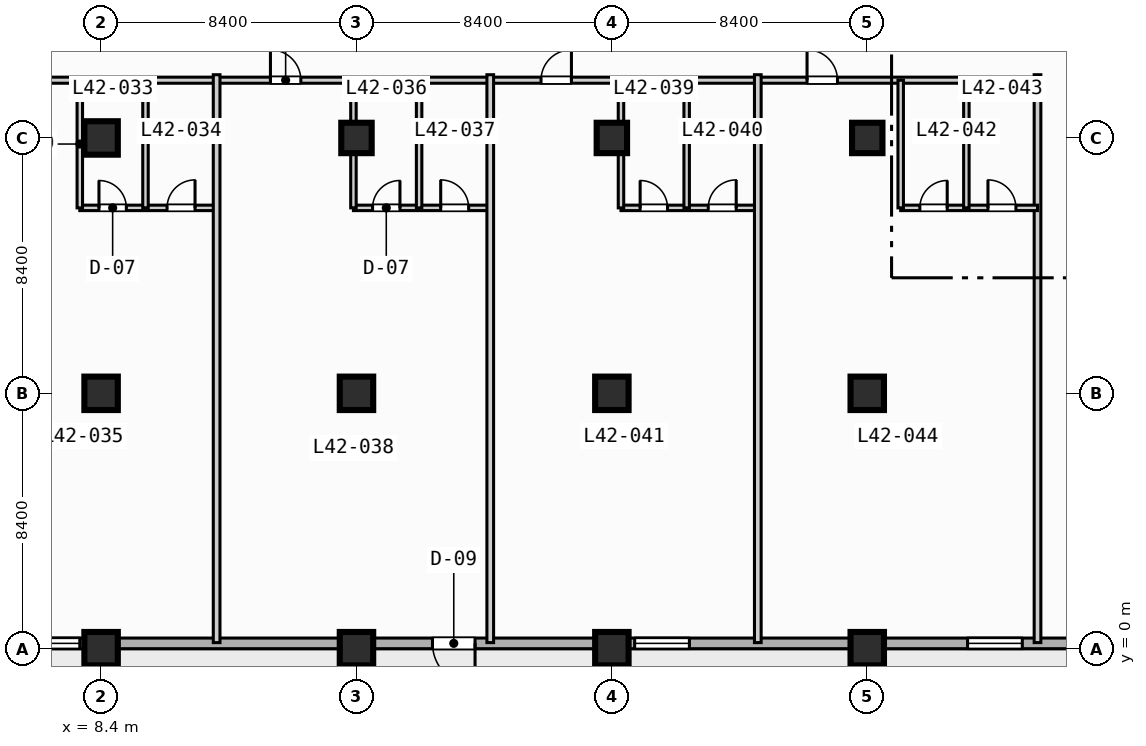
"""IFC4 building model, lengths in metres.
Left out: names, types, materials, properties, quantities, classifications, styles, units other than length and angle.
Written with IfcOpenShell. Run it as: python <this file> out.ifc"""

import sys

from ifc_helpers import new_model, si_unit, direction, frame, frame_2d, origin, origin_2d, place, context, subcontext, project, spatial, rectangle, extrude, element, fill, save


model = new_model("IFC4")
c1 = context("Model", 3, precision=1e-05, world=origin(), true_north=direction((0.0, 1.0)))
c2 = subcontext(c1, "Body", "Model", "MODEL_VIEW")
j1 = project(units=[si_unit("LENGTHUNIT", "METRE"), si_unit("PLANEANGLEUNIT", "RADIAN")], contexts=[c1])
p1 = place(None, origin())
s1 = spatial("IfcSite", under=j1, at=p1, CompositionType="ELEMENT")
p2 = place(p1, origin())
s2 = spatial("IfcBuilding", under=s1, at=p2, CompositionType="ELEMENT")
p3 = place(p2, frame((0.0, 0.0, 175.4)))
s3 = spatial("IfcBuildingStorey", under=s2, at=p3, CompositionType="ELEMENT", Elevation=175.4)
for number, where, z_axis, x_axis in (
    (1, (8.4, 0.0, 0.0), (0.0, 0.0, 1.0), (1.0, 0.0, 0.0)),
    (2, (8.4, 8.4, 0.0), (0.0, 0.0, 1.0), (1.0, 0.0, 0.0)),
    (3, (8.4, 16.8, 0.0), (0.0, 0.0, 1.0), (1.0, 0.0, 0.0)),
    (4, (16.8, 0.0, 0.0), (0.0, 0.0, 1.0), (1.0, 0.0, 0.0)),
    (5, (16.8, 8.4, 0.0), (0.0, 0.0, 1.0), (1.0, 0.0, 0.0)),
):
    element("IfcColumn", number, at=place(p3, frame(where, z_axis=z_axis, x_axis=x_axis)), inside=s3, PredefinedType="COLUMN", context=c2, shape_type="SweptSolid", body=[
        extrude(rectangle(XDim=1.1, YDim=1.1, at=origin_2d()), origin(), (0.0, 0.0, 1.0), 3.7),
    ])
p4 = place(p3, frame((16.8, 16.8, 0.0), z_axis=(0.0, 0.0, 1.0), x_axis=(1.0, 0.0, 0.0)))
e6 = element("IfcColumn", 6, at=p4, inside=s3, PredefinedType="COLUMN", context=c2, shape_type="SweptSolid", body=[
    extrude(rectangle(XDim=1.0, YDim=1.0, at=origin_2d()), origin(), (0.0, 0.0, 1.0), 3.7),
])
for number, where, z_axis, x_axis in (
    (7, (25.2, 0.0, 0.0), (0.0, 0.0, 1.0), (1.0, 0.0, 0.0)),
    (8, (25.2, 8.4, 0.0), (0.0, 0.0, 1.0), (1.0, 0.0, 0.0)),
):
    element("IfcColumn", number, at=place(p3, frame(where, z_axis=z_axis, x_axis=x_axis)), inside=s3, PredefinedType="COLUMN", context=c2, shape_type="SweptSolid", body=[
        extrude(rectangle(XDim=1.1, YDim=1.1, at=origin_2d()), origin(), (0.0, 0.0, 1.0), 3.7),
    ])
p5 = place(p3, frame((25.2, 16.8, 0.0), z_axis=(0.0, 0.0, 1.0), x_axis=(1.0, 0.0, 0.0)))
e9 = element("IfcColumn", 9, at=p5, inside=s3, PredefinedType="COLUMN", context=c2, shape_type="SweptSolid", body=[
    extrude(rectangle(XDim=1.0, YDim=1.0, at=origin_2d()), origin(), (0.0, 0.0, 1.0), 3.7),
])
for number, where, z_axis, x_axis in (
    (10, (33.6, 0.0, 0.0), (0.0, 0.0, 1.0), (1.0, 0.0, 0.0)),
    (11, (33.6, 8.4, 0.0), (0.0, 0.0, 1.0), (1.0, 0.0, 0.0)),
):
    element("IfcColumn", number, at=place(p3, frame(where, z_axis=z_axis, x_axis=x_axis)), inside=s3, PredefinedType="COLUMN", context=c2, shape_type="SweptSolid", body=[
        extrude(rectangle(XDim=1.1, YDim=1.1, at=origin_2d()), origin(), (0.0, 0.0, 1.0), 3.7),
    ])
p6 = place(p3, frame((33.6, 16.8, 0.0), z_axis=(0.0, 0.0, 1.0), x_axis=(1.0, 0.0, 0.0)))
e12 = element("IfcColumn", 12, at=p6, inside=s3, PredefinedType="COLUMN", context=c2, shape_type="SweptSolid", body=[
    extrude(rectangle(XDim=1.0, YDim=1.0, at=origin_2d()), origin(), (0.0, 0.0, 1.0), 3.7),
])
p7 = place(p3, frame((72.425, 0.175, 0.0), z_axis=(0.0, 0.0, 1.0), x_axis=(-1.0, 0.0, 0.0)))
e13 = element("IfcWall", 13, at=p7, inside=s3, PredefinedType="STANDARD", context=c2, shape_type="SweptSolid", body=[
    extrude(rectangle(XDim=69.25, YDim=0.35, at=frame_2d((34.625, 0.0))), origin(), (0.0, 0.0, 1.0), 3.47),
])
p8 = place(p7, frame((51.725, 0.0, 0.0)))
e14 = element("IfcOpeningElement", 14, at=p8, cuts=e13, PredefinedType="OPENING", context=c2, shape_type="SweptSolid", body=[
    extrude(rectangle(XDim=1.4, YDim=2.2, at=frame_2d((0.7, 1.1))), frame((0.0, 0.185, 0.0), z_axis=(0.0, -1.0, 0.0), x_axis=(1.0, 0.0, 0.0)), (0.0, 0.0, 1.0), 0.37),
])
p9 = place(p7, frame((33.725, 0.0, 0.85)))
e15 = element("IfcOpeningElement", 15, at=p9, cuts=e13, PredefinedType="OPENING", context=c2, shape_type="SweptSolid", body=[
    extrude(rectangle(XDim=1.8, YDim=1.8, at=frame_2d((0.9, 0.9))), frame((0.0, 0.185, 0.0), z_axis=(0.0, -1.0, 0.0), x_axis=(1.0, 0.0, 0.0)), (0.0, 0.0, 1.0), 0.37),
])
p10 = place(p7, frame((25.025, 0.0, 0.85)))
e16 = element("IfcOpeningElement", 16, at=p10, cuts=e13, PredefinedType="OPENING", context=c2, shape_type="SweptSolid", body=[
    extrude(rectangle(XDim=2.4, YDim=1.95, at=frame_2d((1.2, 0.975))), frame((0.0, 0.185, 0.0), z_axis=(0.0, -1.0, 0.0), x_axis=(1.0, 0.0, 0.0)), (0.0, 0.0, 1.0), 0.37),
])
p11 = place(p7, frame((8.225, 0.0, 0.85)))
e17 = element("IfcOpeningElement", 17, at=p11, cuts=e13, PredefinedType="OPENING", context=c2, shape_type="SweptSolid", body=[
    extrude(rectangle(XDim=2.4, YDim=1.95, at=frame_2d((1.2, 0.975))), frame((0.0, 0.185, 0.0), z_axis=(0.0, -1.0, 0.0), x_axis=(1.0, 0.0, 0.0)), (0.0, 0.0, 1.0), 0.37),
])
p12 = place(p7, frame((64.725, 0.0, 0.85)))
e18 = element("IfcOpeningElement", 18, at=p12, cuts=e13, PredefinedType="OPENING", context=c2, shape_type="SweptSolid", body=[
    extrude(rectangle(XDim=1.8, YDim=1.8, at=frame_2d((0.9, 0.9))), frame((0.0, 0.185, 0.0), z_axis=(0.0, -1.0, 0.0), x_axis=(1.0, 0.0, 0.0)), (0.0, 0.0, 1.0), 0.37),
])
p13 = place(p7, frame((44.675, 0.0, 0.85)))
e19 = element("IfcOpeningElement", 19, at=p13, cuts=e13, PredefinedType="OPENING", context=c2, shape_type="SweptSolid", body=[
    extrude(rectangle(XDim=1.8, YDim=1.8, at=frame_2d((0.9, 0.9))), frame((0.0, 0.185, 0.0), z_axis=(0.0, -1.0, 0.0), x_axis=(1.0, 0.0, 0.0)), (0.0, 0.0, 1.0), 0.37),
])
p14 = place(p3, frame((3.4, 18.7, 0.0), z_axis=(0.0, 0.0, 1.0), x_axis=(1.0, 0.0, 0.0)))
e20 = element("IfcWall", 20, at=p14, inside=s3, PredefinedType="PARTITIONING", context=c2, shape_type="SweptSolid", body=[
    extrude(rectangle(XDim=35.8, YDim=0.2, at=frame_2d((17.9, 0.0))), origin(), (0.0, 0.0, 1.0), 3.47),
])
p15 = place(p14, frame((1.67, 0.0, 0.0)))
e21 = element("IfcOpeningElement", 21, at=p15, cuts=e20, PredefinedType="OPENING", context=c2, shape_type="SweptSolid", body=[
    extrude(rectangle(XDim=1.0, YDim=2.15, at=frame_2d((0.5, 1.075))), frame((0.0, 0.11, 0.0), z_axis=(0.0, -1.0, 0.0), x_axis=(1.0, 0.0, 0.0)), (0.0, 0.0, 1.0), 0.22),
])
p16 = place(p14, frame((10.57, 0.0, 0.0)))
e22 = element("IfcOpeningElement", 22, at=p16, cuts=e20, PredefinedType="OPENING", context=c2, shape_type="SweptSolid", body=[
    extrude(rectangle(XDim=1.0, YDim=2.15, at=frame_2d((0.5, 1.075))), frame((0.0, 0.11, 0.0), z_axis=(0.0, -1.0, 0.0), x_axis=(1.0, 0.0, 0.0)), (0.0, 0.0, 1.0), 0.22),
])
p17 = place(p14, frame((19.47, 0.0, 0.0)))
e23 = element("IfcOpeningElement", 23, at=p17, cuts=e20, PredefinedType="OPENING", context=c2, shape_type="SweptSolid", body=[
    extrude(rectangle(XDim=1.0, YDim=2.15, at=frame_2d((0.5, 1.075))), frame((0.0, 0.11, 0.0), z_axis=(0.0, -1.0, 0.0), x_axis=(1.0, 0.0, 0.0)), (0.0, 0.0, 1.0), 0.22),
])
p18 = place(p14, frame((28.22, 0.0, 0.0)))
e24 = element("IfcOpeningElement", 24, at=p18, cuts=e20, PredefinedType="OPENING", context=c2, shape_type="SweptSolid", body=[
    extrude(rectangle(XDim=1.0, YDim=2.15, at=frame_2d((0.5, 1.075))), frame((0.0, 0.11, 0.0), z_axis=(0.0, -1.0, 0.0), x_axis=(1.0, 0.0, 0.0)), (0.0, 0.0, 1.0), 0.22),
])
p19 = place(p3, frame((7.7, 14.5, 0.0), z_axis=(0.0, 0.0, 1.0), x_axis=(1.0, 0.0, 0.0)))
e25 = element("IfcWall", 25, at=p19, inside=s3, PredefinedType="PLUMBINGWALL", context=c2, shape_type="SweptSolid", body=[
    extrude(rectangle(XDim=4.5, YDim=0.18, at=frame_2d((2.25, 0.0))), origin(), (0.0, 0.0, 1.0), 3.47),
])
p20 = place(p19, frame((0.63, 0.0, 0.0)))
e26 = element("IfcOpeningElement", 26, at=p20, cuts=e25, PredefinedType="OPENING", context=c2, shape_type="SweptSolid", body=[
    extrude(rectangle(XDim=0.9, YDim=2.1, at=frame_2d((0.45, 1.05))), frame((0.0, 0.1, 0.0), z_axis=(0.0, -1.0, 0.0), x_axis=(1.0, 0.0, 0.0)), (0.0, 0.0, 1.0), 0.2),
])
p21 = place(p19, frame((2.87, 0.0, 0.0)))
e27 = element("IfcOpeningElement", 27, at=p21, cuts=e25, PredefinedType="OPENING", context=c2, shape_type="SweptSolid", body=[
    extrude(rectangle(XDim=0.92, YDim=2.1, at=frame_2d((0.46, 1.05))), frame((0.0, 0.1, 0.0), z_axis=(0.0, -1.0, 0.0), x_axis=(1.0, 0.0, 0.0)), (0.0, 0.0, 1.0), 0.2),
])
for number, where, z_axis, x_axis in (
    (28, (7.7, 14.5, 0.0), (0.0, 0.0, 1.0), (0.0, 1.0, 0.0)),
    (29, (9.86, 14.5, 0.0), (0.0, 0.0, 1.0), (0.0, 1.0, 0.0)),
):
    element("IfcWall", number, at=place(p3, frame(where, z_axis=z_axis, x_axis=x_axis)), inside=s3, PredefinedType="PLUMBINGWALL", context=c2, shape_type="SweptSolid", body=[
        extrude(rectangle(XDim=4.2, YDim=0.18, at=frame_2d((2.1, 0.0))), origin(), (0.0, 0.0, 1.0), 3.47),
    ])
p22 = place(p3, frame((12.2, 0.2, 0.0), z_axis=(0.0, 0.0, 1.0), x_axis=(0.0, 1.0, 0.0)))
e30 = element("IfcWall", 30, at=p22, inside=s3, PredefinedType="PARTITIONING", context=c2, shape_type="SweptSolid", body=[
    extrude(rectangle(XDim=18.68, YDim=0.22, at=frame_2d((9.34, 0.0))), origin(), (0.0, 0.0, 1.0), 3.47),
])
p23 = place(p3, frame((16.7, 14.5, 0.0), z_axis=(0.0, 0.0, 1.0), x_axis=(1.0, 0.0, 0.0)))
e31 = element("IfcWall", 31, at=p23, inside=s3, PredefinedType="PLUMBINGWALL", context=c2, shape_type="SweptSolid", body=[
    extrude(rectangle(XDim=4.5, YDim=0.18, at=frame_2d((2.25, 0.0))), origin(), (0.0, 0.0, 1.0), 3.47),
])
p24 = place(p23, frame((0.63, 0.0, 0.0)))
e32 = element("IfcOpeningElement", 32, at=p24, cuts=e31, PredefinedType="OPENING", context=c2, shape_type="SweptSolid", body=[
    extrude(rectangle(XDim=0.9, YDim=2.1, at=frame_2d((0.45, 1.05))), frame((0.0, 0.1, 0.0), z_axis=(0.0, -1.0, 0.0), x_axis=(1.0, 0.0, 0.0)), (0.0, 0.0, 1.0), 0.2),
])
p25 = place(p23, frame((2.87, 0.0, 0.0)))
e33 = element("IfcOpeningElement", 33, at=p25, cuts=e31, PredefinedType="OPENING", context=c2, shape_type="SweptSolid", body=[
    extrude(rectangle(XDim=0.92, YDim=2.1, at=frame_2d((0.46, 1.05))), frame((0.0, 0.1, 0.0), z_axis=(0.0, -1.0, 0.0), x_axis=(1.0, 0.0, 0.0)), (0.0, 0.0, 1.0), 0.2),
])
p26 = place(p3, frame((16.7, 14.5, 0.0), z_axis=(0.0, 0.0, 1.0), x_axis=(0.0, 1.0, 0.0)))
e34 = element("IfcWall", 34, at=p26, inside=s3, PredefinedType="PLUMBINGWALL", context=c2, shape_type="SweptSolid", body=[
    extrude(rectangle(XDim=4.2, YDim=0.18, at=frame_2d((2.1, 0.0))), origin(), (0.0, 0.0, 1.0), 2.82),
])
p27 = place(p3, frame((18.86, 14.5, 0.0), z_axis=(0.0, 0.0, 1.0), x_axis=(0.0, 1.0, 0.0)))
e35 = element("IfcWall", 35, at=p27, inside=s3, PredefinedType="PLUMBINGWALL", context=c2, shape_type="SweptSolid", body=[
    extrude(rectangle(XDim=4.2, YDim=0.18, at=frame_2d((2.1, 0.0))), origin(), (0.0, 0.0, 1.0), 3.47),
])
p28 = place(p3, frame((21.2, 0.2, 0.0), z_axis=(0.0, 0.0, 1.0), x_axis=(0.0, 1.0, 0.0)))
e36 = element("IfcWall", 36, at=p28, inside=s3, PredefinedType="PARTITIONING", context=c2, shape_type="SweptSolid", body=[
    extrude(rectangle(XDim=18.68, YDim=0.22, at=frame_2d((9.34, 0.0))), origin(), (0.0, 0.0, 1.0), 3.47),
])
p29 = place(p3, frame((25.5, 14.5, 0.0), z_axis=(0.0, 0.0, 1.0), x_axis=(1.0, 0.0, 0.0)))
e37 = element("IfcWall", 37, at=p29, inside=s3, PredefinedType="PLUMBINGWALL", context=c2, shape_type="SweptSolid", body=[
    extrude(rectangle(XDim=4.5, YDim=0.18, at=frame_2d((2.25, 0.0))), origin(), (0.0, 0.0, 1.0), 3.47),
])
p30 = place(p29, frame((0.63, 0.0, 0.0)))
e38 = element("IfcOpeningElement", 38, at=p30, cuts=e37, PredefinedType="OPENING", context=c2, shape_type="SweptSolid", body=[
    extrude(rectangle(XDim=0.9, YDim=2.1, at=frame_2d((0.45, 1.05))), frame((0.0, 0.1, 0.0), z_axis=(0.0, -1.0, 0.0), x_axis=(1.0, 0.0, 0.0)), (0.0, 0.0, 1.0), 0.2),
])
p31 = place(p29, frame((2.87, 0.0, 0.0)))
e39 = element("IfcOpeningElement", 39, at=p31, cuts=e37, PredefinedType="OPENING", context=c2, shape_type="SweptSolid", body=[
    extrude(rectangle(XDim=0.92, YDim=2.1, at=frame_2d((0.46, 1.05))), frame((0.0, 0.1, 0.0), z_axis=(0.0, -1.0, 0.0), x_axis=(1.0, 0.0, 0.0)), (0.0, 0.0, 1.0), 0.2),
])
p32 = place(p3, frame((25.5, 14.5, 0.0), z_axis=(0.0, 0.0, 1.0), x_axis=(0.0, 1.0, 0.0)))
e40 = element("IfcWall", 40, at=p32, inside=s3, PredefinedType="PLUMBINGWALL", context=c2, shape_type="SweptSolid", body=[
    extrude(rectangle(XDim=4.2, YDim=0.18, at=frame_2d((2.1, 0.0))), origin(), (0.0, 0.0, 1.0), 2.82),
])
p33 = place(p3, frame((27.66, 14.5, 0.0), z_axis=(0.0, 0.0, 1.0), x_axis=(0.0, 1.0, 0.0)))
e41 = element("IfcWall", 41, at=p33, inside=s3, PredefinedType="PLUMBINGWALL", context=c2, shape_type="SweptSolid", body=[
    extrude(rectangle(XDim=4.2, YDim=0.18, at=frame_2d((2.1, 0.0))), origin(), (0.0, 0.0, 1.0), 3.47),
])
for number, where, z_axis, x_axis in (
    (42, (30.0, 0.2, 0.0), (0.0, 0.0, 1.0), (0.0, 1.0, 0.0)),
    (43, (39.2, 0.2, 0.0), (0.0, 0.0, 1.0), (0.0, 1.0, 0.0)),
):
    element("IfcWall", number, at=place(p3, frame(where, z_axis=z_axis, x_axis=x_axis)), inside=s3, PredefinedType="PARTITIONING", context=c2, shape_type="SweptSolid", body=[
        extrude(rectangle(XDim=18.68, YDim=0.22, at=frame_2d((9.34, 0.0))), origin(), (0.0, 0.0, 1.0), 3.47),
    ])
p34 = place(p3, frame((34.7, 14.5, 0.0), z_axis=(0.0, 0.0, 1.0), x_axis=(1.0, 0.0, 0.0)))
e44 = element("IfcWall", 44, at=p34, inside=s3, PredefinedType="PLUMBINGWALL", context=c2, shape_type="SweptSolid", body=[
    extrude(rectangle(XDim=4.5, YDim=0.18, at=frame_2d((2.25, 0.0))), origin(), (0.0, 0.0, 1.0), 3.47),
])
p35 = place(p34, frame((0.63, 0.0, 0.0)))
e45 = element("IfcOpeningElement", 45, at=p35, cuts=e44, PredefinedType="OPENING", context=c2, shape_type="SweptSolid", body=[
    extrude(rectangle(XDim=0.9, YDim=2.1, at=frame_2d((0.45, 1.05))), frame((0.0, 0.1, 0.0), z_axis=(0.0, -1.0, 0.0), x_axis=(1.0, 0.0, 0.0)), (0.0, 0.0, 1.0), 0.2),
])
p36 = place(p34, frame((2.87, 0.0, 0.0)))
e46 = element("IfcOpeningElement", 46, at=p36, cuts=e44, PredefinedType="OPENING", context=c2, shape_type="SweptSolid", body=[
    extrude(rectangle(XDim=0.92, YDim=2.1, at=frame_2d((0.46, 1.05))), frame((0.0, 0.1, 0.0), z_axis=(0.0, -1.0, 0.0), x_axis=(1.0, 0.0, 0.0)), (0.0, 0.0, 1.0), 0.2),
])
for number, where, z_axis, x_axis in (
    (47, (34.7, 14.5, 0.0), (0.0, 0.0, 1.0), (0.0, 1.0, 0.0)),
    (48, (36.86, 14.5, 0.0), (0.0, 0.0, 1.0), (0.0, 1.0, 0.0)),
):
    element("IfcWall", number, at=place(p3, frame(where, z_axis=z_axis, x_axis=x_axis)), inside=s3, PredefinedType="PLUMBINGWALL", context=c2, shape_type="SweptSolid", body=[
        extrude(rectangle(XDim=4.2, YDim=0.18, at=frame_2d((2.1, 0.0))), origin(), (0.0, 0.0, 1.0), 3.47),
    ])
p37 = place(p8, origin())
e49 = element("IfcDoor", 49, at=p37, inside=s3, OperationType="SINGLE_SWING_LEFT", PredefinedType="DOOR", context=c2, shape_type="SweptSolid", body=[
    extrude(rectangle(XDim=1.4, YDim=2.2, at=frame_2d((0.7, 1.1))), frame((0.0, 0.025, 0.0), z_axis=(0.0, -1.0, 0.0), x_axis=(1.0, 0.0, 0.0)), (0.0, 0.0, 1.0), 0.05),
])
fill(e14, e49)
p38 = place(p9, origin())
e50 = element("IfcWindow", 50, at=p38, inside=s3, PartitioningType="SINGLE_PANEL", PredefinedType="WINDOW", context=c2, shape_type="SweptSolid", body=[
    extrude(rectangle(XDim=1.8, YDim=1.8, at=frame_2d((0.9, 0.9))), frame((0.0, 0.03, 0.0), z_axis=(0.0, -1.0, 0.0), x_axis=(1.0, 0.0, 0.0)), (0.0, 0.0, 1.0), 0.06),
])
fill(e15, e50)
p39 = place(p12, origin())
e51 = element("IfcWindow", 51, at=p39, inside=s3, PartitioningType="SINGLE_PANEL", PredefinedType="WINDOW", context=c2, shape_type="SweptSolid", body=[
    extrude(rectangle(XDim=1.8, YDim=1.8, at=frame_2d((0.9, 0.9))), frame((0.0, 0.03, 0.0), z_axis=(0.0, -1.0, 0.0), x_axis=(1.0, 0.0, 0.0)), (0.0, 0.0, 1.0), 0.06),
])
fill(e18, e51)
p40 = place(p13, origin())
e52 = element("IfcWindow", 52, at=p40, inside=s3, PartitioningType="SINGLE_PANEL", PredefinedType="WINDOW", context=c2, shape_type="SweptSolid", body=[
    extrude(rectangle(XDim=1.8, YDim=1.8, at=frame_2d((0.9, 0.9))), frame((0.0, 0.03, 0.0), z_axis=(0.0, -1.0, 0.0), x_axis=(1.0, 0.0, 0.0)), (0.0, 0.0, 1.0), 0.06),
])
fill(e19, e52)
p41 = place(p16, origin())
e53 = element("IfcDoor", 53, at=p41, inside=s3, OperationType="SINGLE_SWING_LEFT", PredefinedType="DOOR", context=c2, shape_type="SweptSolid", body=[
    extrude(rectangle(XDim=1.0, YDim=2.15, at=frame_2d((0.5, 1.075))), frame((0.0, 0.025, 0.0), z_axis=(0.0, -1.0, 0.0), x_axis=(1.0, 0.0, 0.0)), (0.0, 0.0, 1.0), 0.05),
])
fill(e22, e53)
p42 = place(p17, origin())
e54 = element("IfcDoor", 54, at=p42, inside=s3, OperationType="SINGLE_SWING_RIGHT", PredefinedType="DOOR", context=c2, shape_type="SweptSolid", body=[
    extrude(rectangle(XDim=1.0, YDim=2.15, at=frame_2d((0.5, 1.075))), frame((0.0, 0.025, 0.0), z_axis=(0.0, -1.0, 0.0), x_axis=(1.0, 0.0, 0.0)), (0.0, 0.0, 1.0), 0.05),
])
fill(e23, e54)
p43 = place(p18, origin())
e55 = element("IfcDoor", 55, at=p43, inside=s3, OperationType="SINGLE_SWING_LEFT", PredefinedType="DOOR", context=c2, shape_type="SweptSolid", body=[
    extrude(rectangle(XDim=1.0, YDim=2.15, at=frame_2d((0.5, 1.075))), frame((0.0, 0.025, 0.0), z_axis=(0.0, -1.0, 0.0), x_axis=(1.0, 0.0, 0.0)), (0.0, 0.0, 1.0), 0.05),
])
fill(e24, e55)
p44 = place(p20, origin())
e56 = element("IfcDoor", 56, at=p44, inside=s3, OperationType="SINGLE_SWING_LEFT", PredefinedType="DOOR", context=c2, shape_type="SweptSolid", body=[
    extrude(rectangle(XDim=0.9, YDim=2.1, at=frame_2d((0.45, 1.05))), frame((0.0, 0.025, 0.0), z_axis=(0.0, -1.0, 0.0), x_axis=(1.0, 0.0, 0.0)), (0.0, 0.0, 1.0), 0.05),
])
fill(e26, e56)
p45 = place(p21, origin())
e57 = element("IfcDoor", 57, at=p45, inside=s3, OperationType="SINGLE_SWING_RIGHT", PredefinedType="DOOR", context=c2, shape_type="SweptSolid", body=[
    extrude(rectangle(XDim=0.92, YDim=2.1, at=frame_2d((0.46, 1.05))), frame((0.0, 0.025, 0.0), z_axis=(0.0, -1.0, 0.0), x_axis=(1.0, 0.0, 0.0)), (0.0, 0.0, 1.0), 0.05),
])
fill(e27, e57)
p46 = place(p24, origin())
e58 = element("IfcDoor", 58, at=p46, inside=s3, OperationType="SINGLE_SWING_RIGHT", PredefinedType="DOOR", context=c2, shape_type="SweptSolid", body=[
    extrude(rectangle(XDim=0.9, YDim=2.1, at=frame_2d((0.45, 1.05))), frame((0.0, 0.025, 0.0), z_axis=(0.0, -1.0, 0.0), x_axis=(1.0, 0.0, 0.0)), (0.0, 0.0, 1.0), 0.05),
])
fill(e32, e58)
p47 = place(p25, origin())
e59 = element("IfcDoor", 59, at=p47, inside=s3, OperationType="SINGLE_SWING_LEFT", PredefinedType="DOOR", context=c2, shape_type="SweptSolid", body=[
    extrude(rectangle(XDim=0.92, YDim=2.1, at=frame_2d((0.46, 1.05))), frame((0.0, 0.025, 0.0), z_axis=(0.0, -1.0, 0.0), x_axis=(1.0, 0.0, 0.0)), (0.0, 0.0, 1.0), 0.05),
])
fill(e33, e59)
p48 = place(p30, origin())
e60 = element("IfcDoor", 60, at=p48, inside=s3, OperationType="SINGLE_SWING_LEFT", PredefinedType="DOOR", context=c2, shape_type="SweptSolid", body=[
    extrude(rectangle(XDim=0.9, YDim=2.1, at=frame_2d((0.45, 1.05))), frame((0.0, 0.025, 0.0), z_axis=(0.0, -1.0, 0.0), x_axis=(1.0, 0.0, 0.0)), (0.0, 0.0, 1.0), 0.05),
])
fill(e38, e60)
p49 = place(p31, origin())
e61 = element("IfcDoor", 61, at=p49, inside=s3, OperationType="SINGLE_SWING_RIGHT", PredefinedType="DOOR", context=c2, shape_type="SweptSolid", body=[
    extrude(rectangle(XDim=0.92, YDim=2.1, at=frame_2d((0.46, 1.05))), frame((0.0, 0.025, 0.0), z_axis=(0.0, -1.0, 0.0), x_axis=(1.0, 0.0, 0.0)), (0.0, 0.0, 1.0), 0.05),
])
fill(e39, e61)
p50 = place(p35, origin())
e62 = element("IfcDoor", 62, at=p50, inside=s3, OperationType="SINGLE_SWING_RIGHT", PredefinedType="DOOR", context=c2, shape_type="SweptSolid", body=[
    extrude(rectangle(XDim=0.9, YDim=2.1, at=frame_2d((0.45, 1.05))), frame((0.0, 0.025, 0.0), z_axis=(0.0, -1.0, 0.0), x_axis=(1.0, 0.0, 0.0)), (0.0, 0.0, 1.0), 0.05),
])
fill(e45, e62)
p51 = place(p36, origin())
e63 = element("IfcDoor", 63, at=p51, inside=s3, OperationType="SINGLE_SWING_LEFT", PredefinedType="DOOR", context=c2, shape_type="SweptSolid", body=[
    extrude(rectangle(XDim=0.92, YDim=2.1, at=frame_2d((0.46, 1.05))), frame((0.0, 0.025, 0.0), z_axis=(0.0, -1.0, 0.0), x_axis=(1.0, 0.0, 0.0)), (0.0, 0.0, 1.0), 0.05),
])
fill(e46, e63)
save(model, sys.argv[1])
